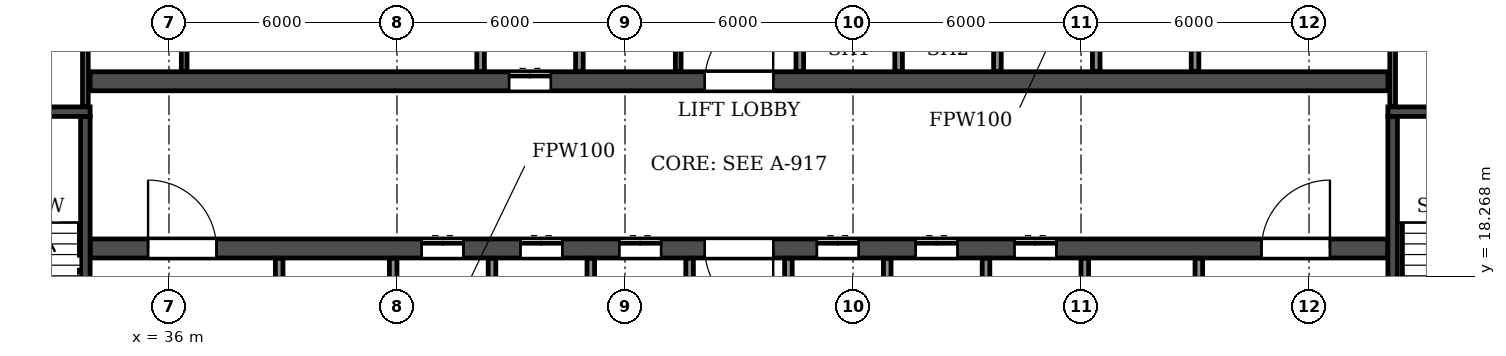
"""IFC4 building model, lengths in metres.
Left out: names, types, materials, properties, quantities, classifications, styles, units other than length and angle.
Written with IfcOpenShell. Run it as: python <this file> out.ifc"""

import sys

from ifc_helpers import new_model, si_unit, direction, frame, frame_2d, origin, place, context, subcontext, project, spatial, rectangle, extrude, element, fill, save


model = new_model("IFC4")
c1 = context("Model", 3, precision=1e-05, world=origin(), true_north=direction((0.0, 1.0)))
c2 = subcontext(c1, "Body", "Model", "MODEL_VIEW")
j1 = project(units=[si_unit("LENGTHUNIT", "METRE"), si_unit("PLANEANGLEUNIT", "RADIAN")], contexts=[c1])
p1 = place(None, origin())
s1 = spatial("IfcSite", under=j1, at=p1, CompositionType="ELEMENT")
p2 = place(p1, origin())
s2 = spatial("IfcBuilding", under=s1, at=p2, CompositionType="ELEMENT")
p3 = place(p2, frame((0.0, 0.0, 92.7)))
s3 = spatial("IfcBuildingStorey", under=s2, at=p3, CompositionType="ELEMENT", Elevation=92.7)
p4 = place(p3, frame((33.925, 19.0, 0.0), z_axis=(0.0, 0.0, 1.0), x_axis=(1.0, 0.0, 0.0)))
e1 = element("IfcWall", 1, at=p4, inside=s3, PredefinedType="SOLIDWALL", context=c2, shape_type="SweptSolid", body=[
    extrude(rectangle(XDim=34.15, YDim=0.5, at=frame_2d((17.075, 0.0))), origin(), (0.0, 0.0, 1.0), 3.06),
])
p5 = place(p4, frame((16.175, 0.0, 0.0)))
e2 = element("IfcOpeningElement", 2, at=p5, cuts=e1, PredefinedType="OPENING", context=c2, shape_type="SweptSolid", body=[
    extrude(rectangle(XDim=1.8, YDim=2.1, at=frame_2d((0.9, 1.05))), frame((0.0, 0.26, 0.0), z_axis=(0.0, -1.0, 0.0), x_axis=(1.0, 0.0, 0.0)), (0.0, 0.0, 1.0), 0.52),
])
p6 = place(p4, frame((1.525, 0.0, 0.0)))
e3 = element("IfcOpeningElement", 3, at=p6, cuts=e1, PredefinedType="OPENING", context=c2, shape_type="SweptSolid", body=[
    extrude(rectangle(XDim=1.8, YDim=2.1, at=frame_2d((0.9, 1.05))), frame((0.0, 0.26, 0.0), z_axis=(0.0, -1.0, 0.0), x_axis=(1.0, 0.0, 0.0)), (0.0, 0.0, 1.0), 0.52),
])
p7 = place(p4, frame((8.725, 0.0, 0.0)))
e4 = element("IfcOpeningElement", 4, at=p7, cuts=e1, PredefinedType="OPENING", context=c2, shape_type="SweptSolid", body=[
    extrude(rectangle(XDim=1.1, YDim=2.1, at=frame_2d((0.55, 1.05))), frame((0.0, 0.26, 0.0), z_axis=(0.0, -1.0, 0.0), x_axis=(1.0, 0.0, 0.0)), (0.0, 0.0, 1.0), 0.52),
])
p8 = place(p4, frame((11.325, 0.0, 0.0)))
e5 = element("IfcOpeningElement", 5, at=p8, cuts=e1, PredefinedType="OPENING", context=c2, shape_type="SweptSolid", body=[
    extrude(rectangle(XDim=1.1, YDim=2.1, at=frame_2d((0.55, 1.05))), frame((0.0, 0.26, 0.0), z_axis=(0.0, -1.0, 0.0), x_axis=(1.0, 0.0, 0.0)), (0.0, 0.0, 1.0), 0.52),
])
p9 = place(p4, frame((13.925, 0.0, 0.0)))
e6 = element("IfcOpeningElement", 6, at=p9, cuts=e1, PredefinedType="OPENING", context=c2, shape_type="SweptSolid", body=[
    extrude(rectangle(XDim=1.1, YDim=2.1, at=frame_2d((0.55, 1.05))), frame((0.0, 0.26, 0.0), z_axis=(0.0, -1.0, 0.0), x_axis=(1.0, 0.0, 0.0)), (0.0, 0.0, 1.0), 0.52),
])
p10 = place(p4, frame((19.125, 0.0, 0.0)))
e7 = element("IfcOpeningElement", 7, at=p10, cuts=e1, PredefinedType="OPENING", context=c2, shape_type="SweptSolid", body=[
    extrude(rectangle(XDim=1.1, YDim=2.1, at=frame_2d((0.55, 1.05))), frame((0.0, 0.26, 0.0), z_axis=(0.0, -1.0, 0.0), x_axis=(1.0, 0.0, 0.0)), (0.0, 0.0, 1.0), 0.52),
])
p11 = place(p4, frame((21.725, 0.0, 0.0)))
e8 = element("IfcOpeningElement", 8, at=p11, cuts=e1, PredefinedType="OPENING", context=c2, shape_type="SweptSolid", body=[
    extrude(rectangle(XDim=1.1, YDim=2.1, at=frame_2d((0.55, 1.05))), frame((0.0, 0.26, 0.0), z_axis=(0.0, -1.0, 0.0), x_axis=(1.0, 0.0, 0.0)), (0.0, 0.0, 1.0), 0.52),
])
p12 = place(p4, frame((24.325, 0.0, 0.0)))
e9 = element("IfcOpeningElement", 9, at=p12, cuts=e1, PredefinedType="OPENING", context=c2, shape_type="SweptSolid", body=[
    extrude(rectangle(XDim=1.1, YDim=2.1, at=frame_2d((0.55, 1.05))), frame((0.0, 0.26, 0.0), z_axis=(0.0, -1.0, 0.0), x_axis=(1.0, 0.0, 0.0)), (0.0, 0.0, 1.0), 0.52),
])
p13 = place(p4, frame((30.825, 0.0, 0.0)))
e10 = element("IfcOpeningElement", 10, at=p13, cuts=e1, PredefinedType="OPENING", context=c2, shape_type="SweptSolid", body=[
    extrude(rectangle(XDim=1.8, YDim=2.1, at=frame_2d((0.9, 1.05))), frame((0.0, 0.26, 0.0), z_axis=(0.0, -1.0, 0.0), x_axis=(1.0, 0.0, 0.0)), (0.0, 0.0, 1.0), 0.52),
])
p14 = place(p3, frame((33.925, 23.4, 0.0), z_axis=(0.0, 0.0, 1.0), x_axis=(1.0, 0.0, 0.0)))
e11 = element("IfcWall", 11, at=p14, inside=s3, PredefinedType="SOLIDWALL", context=c2, shape_type="SweptSolid", body=[
    extrude(rectangle(XDim=34.15, YDim=0.5, at=frame_2d((17.075, 0.0))), origin(), (0.0, 0.0, 1.0), 3.06),
])
p15 = place(p14, frame((16.175, 0.0, 0.0)))
e12 = element("IfcOpeningElement", 12, at=p15, cuts=e11, PredefinedType="OPENING", context=c2, shape_type="SweptSolid", body=[
    extrude(rectangle(XDim=1.8, YDim=2.1, at=frame_2d((0.9, 1.05))), frame((0.0, 0.26, 0.0), z_axis=(0.0, -1.0, 0.0), x_axis=(1.0, 0.0, 0.0)), (0.0, 0.0, 1.0), 0.52),
])
p16 = place(p14, frame((11.025, 0.0, 0.0)))
e13 = element("IfcOpeningElement", 13, at=p16, cuts=e11, PredefinedType="OPENING", context=c2, shape_type="SweptSolid", body=[
    extrude(rectangle(XDim=1.1, YDim=2.1, at=frame_2d((0.55, 1.05))), frame((0.0, 0.26, 0.0), z_axis=(0.0, -1.0, 0.0), x_axis=(1.0, 0.0, 0.0)), (0.0, 0.0, 1.0), 0.52),
])
p17 = place(p3, frame((33.8, 14.85, 0.0), z_axis=(0.0, 0.0, 1.0), x_axis=(0.0, 1.0, 0.0)))
e14 = element("IfcWall", 14, at=p17, inside=s3, PredefinedType="SOLIDWALL", context=c2, shape_type="SweptSolid", body=[
    extrude(rectangle(XDim=7.625, YDim=0.25, at=frame_2d((3.812, 0.0))), origin(), (0.0, 0.0, 1.0), 3.06),
])
p18 = place(p17, frame((0.45, 0.0, 0.0)))
e15 = element("IfcOpeningElement", 15, at=p18, cuts=e14, PredefinedType="OPENING", context=c2, shape_type="SweptSolid", body=[
    extrude(rectangle(XDim=1.0, YDim=2.1, at=frame_2d((0.5, 1.05))), frame((0.0, 0.135, 0.0), z_axis=(0.0, -1.0, 0.0), x_axis=(1.0, 0.0, 0.0)), (0.0, 0.0, 1.0), 0.27),
])
p19 = place(p3, frame((29.875, 22.6, 0.0), z_axis=(0.0, 0.0, 1.0), x_axis=(1.0, 0.0, 0.0)))
e16 = element("IfcWall", 16, at=p19, inside=s3, PredefinedType="SOLIDWALL", context=c2, shape_type="SweptSolid", body=[
    extrude(rectangle(XDim=4.05, YDim=0.25, at=frame_2d((2.025, 0.0))), origin(), (0.0, 0.0, 1.0), 3.06),
])
p20 = place(p3, frame((68.2, 14.85, 0.0), z_axis=(0.0, 0.0, 1.0), x_axis=(0.0, 1.0, 0.0)))
e17 = element("IfcWall", 17, at=p20, inside=s3, PredefinedType="SOLIDWALL", context=c2, shape_type="SweptSolid", body=[
    extrude(rectangle(XDim=7.625, YDim=0.25, at=frame_2d((3.812, 0.0))), origin(), (0.0, 0.0, 1.0), 3.06),
])
p21 = place(p20, frame((0.45, 0.0, 0.0)))
e18 = element("IfcOpeningElement", 18, at=p21, cuts=e17, PredefinedType="OPENING", context=c2, shape_type="SweptSolid", body=[
    extrude(rectangle(XDim=1.0, YDim=2.1, at=frame_2d((0.5, 1.05))), frame((0.0, 0.135, 0.0), z_axis=(0.0, -1.0, 0.0), x_axis=(1.0, 0.0, 0.0)), (0.0, 0.0, 1.0), 0.27),
])
p22 = place(p3, frame((68.075, 22.6, 0.0), z_axis=(0.0, 0.0, 1.0), x_axis=(1.0, 0.0, 0.0)))
e19 = element("IfcWall", 19, at=p22, inside=s3, PredefinedType="SOLIDWALL", context=c2, shape_type="SweptSolid", body=[
    extrude(rectangle(XDim=4.05, YDim=0.25, at=frame_2d((2.025, 0.0))), origin(), (0.0, 0.0, 1.0), 3.06),
])
for number, where, z_axis, x_axis in (
    (20, (49.4, 23.66, 0.0), (0.0, 0.0, 1.0), (0.0, 1.0, 0.0)),
    (21, (36.4, 23.66, 0.0), (0.0, 0.0, 1.0), (0.0, 1.0, 0.0)),
):
    element("IfcWall", number, at=place(p3, frame(where, z_axis=z_axis, x_axis=x_axis)), inside=s3, PredefinedType="PARTITIONING", context=c2, shape_type="SweptSolid", body=[
        extrude(rectangle(XDim=3.88, YDim=0.15, at=frame_2d((1.94, 0.0))), origin(), (0.0, 0.0, 1.0), 3.06),
    ])
p23 = place(p3, frame((63.0, 23.66, 0.0), z_axis=(0.0, 0.0, 1.0), x_axis=(0.0, 1.0, 0.0)))
e22 = element("IfcWall", 22, at=p23, inside=s3, PredefinedType="PARTITIONING", context=c2, shape_type="SweptSolid", body=[
    extrude(rectangle(XDim=3.88, YDim=0.2, at=frame_2d((1.94, 0.0))), origin(), (0.0, 0.0, 1.0), 3.06),
])
for number, where, z_axis, x_axis in (
    (23, (33.8, 22.735, 0.0), (0.0, 0.0, 1.0), (0.0, 1.0, 0.0)),
    (24, (68.2, 22.735, 0.0), (0.0, 0.0, 1.0), (0.0, 1.0, 0.0)),
):
    element("IfcWall", number, at=place(p3, frame(where, z_axis=z_axis, x_axis=x_axis)), inside=s3, PredefinedType="PARTITIONING", context=c2, shape_type="SweptSolid", body=[
        extrude(rectangle(XDim=4.805, YDim=0.15, at=frame_2d((2.402, 0.0))), origin(), (0.0, 0.0, 1.0), 3.06),
    ])
p24 = place(p3, frame((38.9, 14.86, 0.0), z_axis=(0.0, 0.0, 1.0), x_axis=(0.0, 1.0, 0.0)))
e25 = element("IfcWall", 25, at=p24, inside=s3, PredefinedType="PARTITIONING", context=c2, shape_type="SweptSolid", body=[
    extrude(rectangle(XDim=3.88, YDim=0.2, at=frame_2d((1.94, 0.0))), origin(), (0.0, 0.0, 1.0), 3.06),
])
p25 = place(p24, frame((1.39, 0.0, 0.0)))
e26 = element("IfcOpeningElement", 26, at=p25, cuts=e25, PredefinedType="OPENING", context=c2, shape_type="SweptSolid", body=[
    extrude(rectangle(XDim=1.1, YDim=2.1, at=frame_2d((0.55, 1.05))), frame((0.0, 0.11, 0.0), z_axis=(0.0, -1.0, 0.0), x_axis=(1.0, 0.0, 0.0)), (0.0, 0.0, 1.0), 0.22),
])
p26 = place(p3, frame((41.9, 14.86, 0.0), z_axis=(0.0, 0.0, 1.0), x_axis=(0.0, 1.0, 0.0)))
e27 = element("IfcWall", 27, at=p26, inside=s3, PredefinedType="PARTITIONING", context=c2, shape_type="SweptSolid", body=[
    extrude(rectangle(XDim=3.88, YDim=0.2, at=frame_2d((1.94, 0.0))), origin(), (0.0, 0.0, 1.0), 3.06),
])
p27 = place(p3, frame((44.2, 23.66, 0.0), z_axis=(0.0, 0.0, 1.0), x_axis=(0.0, 1.0, 0.0)))
e28 = element("IfcWall", 28, at=p27, inside=s3, PredefinedType="PARTITIONING", context=c2, shape_type="SweptSolid", body=[
    extrude(rectangle(XDim=3.88, YDim=0.2, at=frame_2d((1.94, 0.0))), origin(), (0.0, 0.0, 1.0), 3.06),
])
p28 = place(p3, frame((44.5, 16.3, 0.0), z_axis=(0.0, 0.0, 1.0), x_axis=(0.0, 1.0, 0.0)))
e29 = element("IfcWall", 29, at=p28, inside=s3, PredefinedType="PARTITIONING", context=c2, shape_type="SweptSolid", body=[
    extrude(rectangle(XDim=2.44, YDim=0.2, at=frame_2d((1.22, 0.0))), origin(), (0.0, 0.0, 1.0), 3.06),
])
p29 = place(p3, frame((46.8, 23.66, 0.0), z_axis=(0.0, 0.0, 1.0), x_axis=(0.0, 1.0, 0.0)))
e30 = element("IfcWall", 30, at=p29, inside=s3, PredefinedType="PARTITIONING", context=c2, shape_type="SweptSolid", body=[
    extrude(rectangle(XDim=3.88, YDim=0.2, at=frame_2d((1.94, 0.0))), origin(), (0.0, 0.0, 1.0), 3.06),
])
for number, where, z_axis, x_axis in (
    (31, (47.1, 16.3, 0.0), (0.0, 0.0, 1.0), (0.0, 1.0, 0.0)),
    (32, (49.7, 16.3, 0.0), (0.0, 0.0, 1.0), (0.0, 1.0, 0.0)),
    (33, (52.3, 16.3, 0.0), (0.0, 0.0, 1.0), (0.0, 1.0, 0.0)),
):
    element("IfcWall", number, at=place(p3, frame(where, z_axis=z_axis, x_axis=x_axis)), inside=s3, PredefinedType="PARTITIONING", context=c2, shape_type="SweptSolid", body=[
        extrude(rectangle(XDim=2.44, YDim=0.2, at=frame_2d((1.22, 0.0))), origin(), (0.0, 0.0, 1.0), 3.06),
    ])
p30 = place(p3, frame((52.6, 23.66, 0.0), z_axis=(0.0, 0.0, 1.0), x_axis=(0.0, 1.0, 0.0)))
e34 = element("IfcWall", 34, at=p30, inside=s3, PredefinedType="PARTITIONING", context=c2, shape_type="SweptSolid", body=[
    extrude(rectangle(XDim=2.44, YDim=0.2, at=frame_2d((1.22, 0.0))), origin(), (0.0, 0.0, 1.0), 3.06),
])
p31 = place(p3, frame((54.9, 16.3, 0.0), z_axis=(0.0, 0.0, 1.0), x_axis=(0.0, 1.0, 0.0)))
e35 = element("IfcWall", 35, at=p31, inside=s3, PredefinedType="PARTITIONING", context=c2, shape_type="SweptSolid", body=[
    extrude(rectangle(XDim=2.44, YDim=0.2, at=frame_2d((1.22, 0.0))), origin(), (0.0, 0.0, 1.0), 3.06),
])
p32 = place(p3, frame((55.2, 23.66, 0.0), z_axis=(0.0, 0.0, 1.0), x_axis=(0.0, 1.0, 0.0)))
e36 = element("IfcWall", 36, at=p32, inside=s3, PredefinedType="PARTITIONING", context=c2, shape_type="SweptSolid", body=[
    extrude(rectangle(XDim=2.44, YDim=0.2, at=frame_2d((1.22, 0.0))), origin(), (0.0, 0.0, 1.0), 3.06),
])
p33 = place(p3, frame((57.5, 16.3, 0.0), z_axis=(0.0, 0.0, 1.0), x_axis=(0.0, 1.0, 0.0)))
e37 = element("IfcWall", 37, at=p33, inside=s3, PredefinedType="PARTITIONING", context=c2, shape_type="SweptSolid", body=[
    extrude(rectangle(XDim=2.44, YDim=0.2, at=frame_2d((1.22, 0.0))), origin(), (0.0, 0.0, 1.0), 3.06),
])
p34 = place(p3, frame((57.8, 23.66, 0.0), z_axis=(0.0, 0.0, 1.0), x_axis=(0.0, 1.0, 0.0)))
e38 = element("IfcWall", 38, at=p34, inside=s3, PredefinedType="PARTITIONING", context=c2, shape_type="SweptSolid", body=[
    extrude(rectangle(XDim=2.44, YDim=0.2, at=frame_2d((1.22, 0.0))), origin(), (0.0, 0.0, 1.0), 3.06),
])
p35 = place(p3, frame((60.1, 14.86, 0.0), z_axis=(0.0, 0.0, 1.0), x_axis=(0.0, 1.0, 0.0)))
e39 = element("IfcWall", 39, at=p35, inside=s3, PredefinedType="PARTITIONING", context=c2, shape_type="SweptSolid", body=[
    extrude(rectangle(XDim=3.88, YDim=0.2, at=frame_2d((1.94, 0.0))), origin(), (0.0, 0.0, 1.0), 3.06),
])
p36 = place(p3, frame((60.4, 23.66, 0.0), z_axis=(0.0, 0.0, 1.0), x_axis=(0.0, 1.0, 0.0)))
e40 = element("IfcWall", 40, at=p36, inside=s3, PredefinedType="PARTITIONING", context=c2, shape_type="SweptSolid", body=[
    extrude(rectangle(XDim=2.44, YDim=0.2, at=frame_2d((1.22, 0.0))), origin(), (0.0, 0.0, 1.0), 3.06),
])
p37 = place(p3, frame((63.1, 14.86, 0.0), z_axis=(0.0, 0.0, 1.0), x_axis=(0.0, 1.0, 0.0)))
e41 = element("IfcWall", 41, at=p37, inside=s3, PredefinedType="PARTITIONING", context=c2, shape_type="SweptSolid", body=[
    extrude(rectangle(XDim=3.88, YDim=0.2, at=frame_2d((1.94, 0.0))), origin(), (0.0, 0.0, 1.0), 3.06),
])
p38 = place(p37, frame((1.39, 0.0, 0.0)))
e42 = element("IfcOpeningElement", 42, at=p38, cuts=e41, PredefinedType="OPENING", context=c2, shape_type="SweptSolid", body=[
    extrude(rectangle(XDim=1.1, YDim=2.1, at=frame_2d((0.55, 1.05))), frame((0.0, 0.11, 0.0), z_axis=(0.0, -1.0, 0.0), x_axis=(1.0, 0.0, 0.0)), (0.0, 0.0, 1.0), 0.22),
])
p39 = place(p15, origin())
e43 = element("IfcDoor", 43, at=p39, inside=s3, OperationType="DOUBLE_DOOR_SINGLE_SWING", PredefinedType="DOOR", context=c2, shape_type="SweptSolid", body=[
    extrude(rectangle(XDim=1.8, YDim=2.1, at=frame_2d((0.9, 1.05))), frame((0.0, 0.025, 0.0), z_axis=(0.0, -1.0, 0.0), x_axis=(1.0, 0.0, 0.0)), (0.0, 0.0, 1.0), 0.05),
])
fill(e12, e43)
p40 = place(p5, frame((1.8, 0.0, 0.0), z_axis=(0.0, 0.0, 1.0), x_axis=(-1.0, 0.0, 0.0)))
e44 = element("IfcDoor", 44, at=p40, inside=s3, OperationType="DOUBLE_DOOR_SINGLE_SWING", PredefinedType="DOOR", context=c2, shape_type="SweptSolid", body=[
    extrude(rectangle(XDim=1.8, YDim=2.1, at=frame_2d((0.9, 1.05))), frame((0.0, 0.025, 0.0), z_axis=(0.0, -1.0, 0.0), x_axis=(1.0, 0.0, 0.0)), (0.0, 0.0, 1.0), 0.05),
])
fill(e2, e44)
p41 = place(p6, origin())
e45 = element("IfcDoor", 45, at=p41, inside=s3, OperationType="DOUBLE_DOOR_SINGLE_SWING", PredefinedType="DOOR", context=c2, shape_type="SweptSolid", body=[
    extrude(rectangle(XDim=1.8, YDim=2.1, at=frame_2d((0.9, 1.05))), frame((0.0, 0.025, 0.0), z_axis=(0.0, -1.0, 0.0), x_axis=(1.0, 0.0, 0.0)), (0.0, 0.0, 1.0), 0.05),
])
fill(e3, e45)
p42 = place(p7, origin())
e46 = element("IfcDoor", 46, at=p42, inside=s3, OperationType="DOUBLE_DOOR_SLIDING", PredefinedType="DOOR", context=c2, shape_type="SweptSolid", body=[
    extrude(rectangle(XDim=1.1, YDim=2.1, at=frame_2d((0.55, 1.05))), frame((0.0, 0.025, 0.0), z_axis=(0.0, -1.0, 0.0), x_axis=(1.0, 0.0, 0.0)), (0.0, 0.0, 1.0), 0.05),
])
fill(e4, e46)
p43 = place(p16, origin())
e47 = element("IfcDoor", 47, at=p43, inside=s3, OperationType="DOUBLE_DOOR_SLIDING", PredefinedType="DOOR", context=c2, shape_type="SweptSolid", body=[
    extrude(rectangle(XDim=1.1, YDim=2.1, at=frame_2d((0.55, 1.05))), frame((0.0, 0.025, 0.0), z_axis=(0.0, -1.0, 0.0), x_axis=(1.0, 0.0, 0.0)), (0.0, 0.0, 1.0), 0.05),
])
fill(e13, e47)
p44 = place(p8, origin())
e48 = element("IfcDoor", 48, at=p44, inside=s3, OperationType="DOUBLE_DOOR_SLIDING", PredefinedType="DOOR", context=c2, shape_type="SweptSolid", body=[
    extrude(rectangle(XDim=1.1, YDim=2.1, at=frame_2d((0.55, 1.05))), frame((0.0, 0.025, 0.0), z_axis=(0.0, -1.0, 0.0), x_axis=(1.0, 0.0, 0.0)), (0.0, 0.0, 1.0), 0.05),
])
fill(e5, e48)
p45 = place(p9, origin())
e49 = element("IfcDoor", 49, at=p45, inside=s3, OperationType="DOUBLE_DOOR_SLIDING", PredefinedType="DOOR", context=c2, shape_type="SweptSolid", body=[
    extrude(rectangle(XDim=1.1, YDim=2.1, at=frame_2d((0.55, 1.05))), frame((0.0, 0.025, 0.0), z_axis=(0.0, -1.0, 0.0), x_axis=(1.0, 0.0, 0.0)), (0.0, 0.0, 1.0), 0.05),
])
fill(e6, e49)
p46 = place(p10, origin())
e50 = element("IfcDoor", 50, at=p46, inside=s3, OperationType="DOUBLE_DOOR_SLIDING", PredefinedType="DOOR", context=c2, shape_type="SweptSolid", body=[
    extrude(rectangle(XDim=1.1, YDim=2.1, at=frame_2d((0.55, 1.05))), frame((0.0, 0.025, 0.0), z_axis=(0.0, -1.0, 0.0), x_axis=(1.0, 0.0, 0.0)), (0.0, 0.0, 1.0), 0.05),
])
fill(e7, e50)
p47 = place(p11, origin())
e51 = element("IfcDoor", 51, at=p47, inside=s3, OperationType="DOUBLE_DOOR_SLIDING", PredefinedType="DOOR", context=c2, shape_type="SweptSolid", body=[
    extrude(rectangle(XDim=1.1, YDim=2.1, at=frame_2d((0.55, 1.05))), frame((0.0, 0.025, 0.0), z_axis=(0.0, -1.0, 0.0), x_axis=(1.0, 0.0, 0.0)), (0.0, 0.0, 1.0), 0.05),
])
fill(e8, e51)
p48 = place(p12, origin())
e52 = element("IfcDoor", 52, at=p48, inside=s3, OperationType="DOUBLE_DOOR_SLIDING", PredefinedType="DOOR", context=c2, shape_type="SweptSolid", body=[
    extrude(rectangle(XDim=1.1, YDim=2.1, at=frame_2d((0.55, 1.05))), frame((0.0, 0.025, 0.0), z_axis=(0.0, -1.0, 0.0), x_axis=(1.0, 0.0, 0.0)), (0.0, 0.0, 1.0), 0.05),
])
fill(e9, e52)
p49 = place(p13, origin())
e53 = element("IfcDoor", 53, at=p49, inside=s3, OperationType="DOUBLE_DOOR_SINGLE_SWING", PredefinedType="DOOR", context=c2, shape_type="SweptSolid", body=[
    extrude(rectangle(XDim=1.8, YDim=2.1, at=frame_2d((0.9, 1.05))), frame((0.0, 0.025, 0.0), z_axis=(0.0, -1.0, 0.0), x_axis=(1.0, 0.0, 0.0)), (0.0, 0.0, 1.0), 0.05),
])
fill(e10, e53)
save(model, sys.argv[1])
